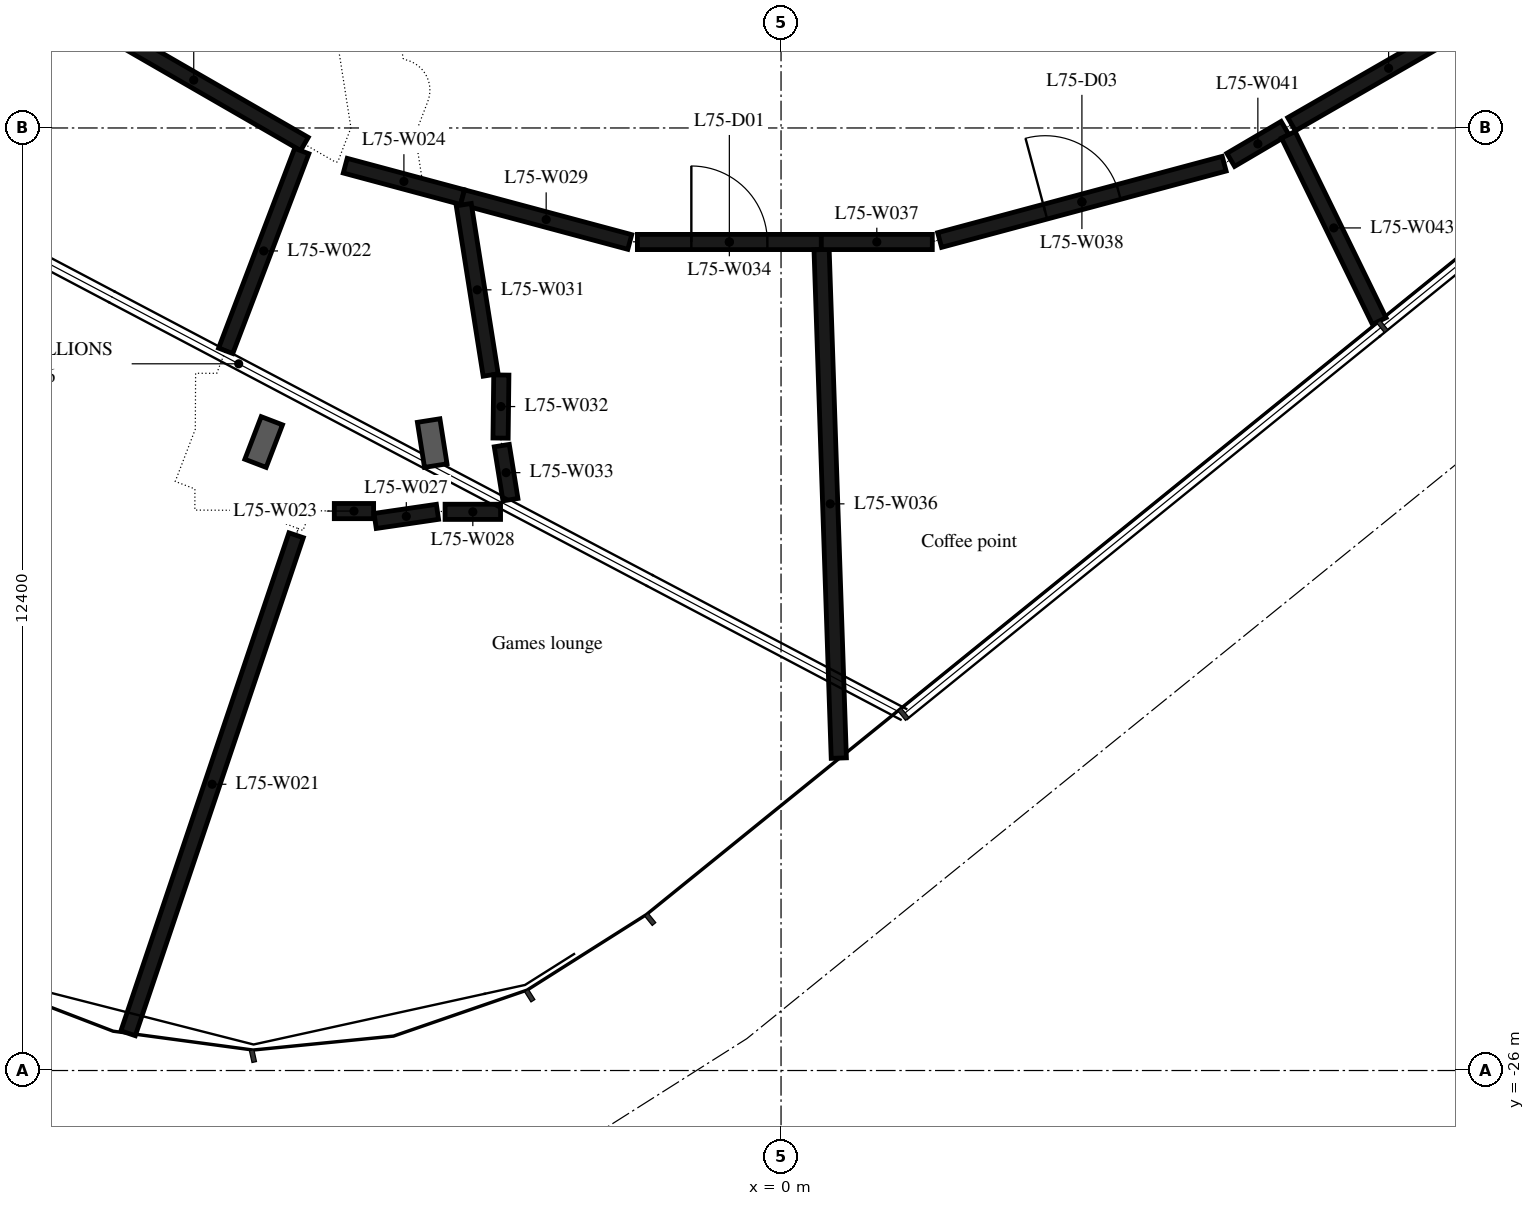
"""IFC4 building model, lengths in metres.
Left out: names, types, materials, properties, quantities, classifications, styles, units other than length and angle.
Written with IfcOpenShell. Run it as: python <this file> out.ifc"""

import sys

from ifc_helpers import new_model, si_unit, direction, frame, frame_2d, origin, place, context, subcontext, project, spatial, rectangle, extrude, element, fill, save


model = new_model("IFC4")
c1 = context("Model", 3, precision=1e-05, world=origin(), true_north=direction((0.0, 1.0)))
c2 = subcontext(c1, "Body", "Model", "MODEL_VIEW")
j1 = project(units=[si_unit("LENGTHUNIT", "METRE"), si_unit("PLANEANGLEUNIT", "RADIAN")], contexts=[c1])
p1 = place(None, origin())
s1 = spatial("IfcSite", under=j1, at=p1, CompositionType="ELEMENT")
p2 = place(p1, origin())
s2 = spatial("IfcBuilding", under=s1, at=p2, CompositionType="ELEMENT")
p3 = place(p2, frame((0.0, 0.0, 291.4)))
s3 = spatial("IfcBuildingStorey", under=s2, at=p3, CompositionType="ELEMENT", Elevation=291.4)
p4 = place(p3, frame((-9.183, -12.13, 0.0), z_axis=(0.0, 0.0, 1.0), x_axis=(0.866261714877, -0.499590473626, 0.0)))
e1 = element("IfcWall", 1, at=p4, inside=s3, PredefinedType="PARTITIONING", context=c2, shape_type="SweptSolid", body=[
    extrude(rectangle(XDim=3.363, YDim=0.2, at=frame_2d((1.682, 0.0))), origin(), (0.0, 0.0, 1.0), 6.35),
])
p5 = place(p3, frame((-6.38, -18.958, 0.0), z_axis=(0.0, 0.0, 1.0), x_axis=(-0.319668100728, -0.947529580212, 0.0)))
e2 = element("IfcWall", 2, at=p5, inside=s3, PredefinedType="PARTITIONING", context=c2, shape_type="SweptSolid", body=[
    extrude(rectangle(XDim=6.915, YDim=0.2, at=frame_2d((3.458, 0.0))), origin(), (0.0, 0.0, 1.0), 6.35),
])
p6 = place(p3, frame((-6.306, -13.904, 0.0), z_axis=(0.0, 0.0, 1.0), x_axis=(-0.355847310917, -0.934544108811, 0.0)))
e3 = element("IfcWall", 3, at=p6, inside=s3, PredefinedType="PARTITIONING", context=c2, shape_type="SweptSolid", body=[
    extrude(rectangle(XDim=2.812, YDim=0.2, at=frame_2d((1.406, 0.0))), origin(), (0.0, 0.0, 1.0), 6.35),
])
p7 = place(p3, frame((-5.877, -18.64, 0.0), z_axis=(0.0, 0.0, 1.0), x_axis=(1.0, 0.0, 0.0)))
e4 = element("IfcWall", 4, at=p7, inside=s3, PredefinedType="PARTITIONING", context=c2, shape_type="SweptSolid", body=[
    extrude(rectangle(XDim=0.517, YDim=0.2, at=frame_2d((0.259, 0.0))), origin(), (0.0, 0.0, 1.0), 6.35),
])
p8 = place(p3, frame((-5.733, -14.096, 0.0), z_axis=(0.0, 0.0, 1.0), x_axis=(0.965848432571, -0.259107709845, 0.0)))
e5 = element("IfcWall", 5, at=p8, inside=s3, PredefinedType="PARTITIONING", context=c2, shape_type="SweptSolid", body=[
    extrude(rectangle(XDim=1.598, YDim=0.2, at=frame_2d((0.799, 0.0))), origin(), (0.0, 0.0, 1.0), 6.35),
])
p9 = place(p3, frame((-5.34, -18.77, 0.0), z_axis=(0.0, 0.0, 1.0), x_axis=(0.9894425278, 0.144925788532, 0.0)))
e6 = element("IfcWall", 6, at=p9, inside=s3, PredefinedType="PARTITIONING", context=c2, shape_type="SweptSolid", body=[
    extrude(rectangle(XDim=0.829, YDim=0.2, at=frame_2d((0.415, 0.0))), origin(), (0.0, 0.0, 1.0), 6.35),
])
p10 = place(p3, frame((-4.42, -18.65, 0.0), z_axis=(0.0, 0.0, 1.0), x_axis=(1.0, 0.0, 0.0)))
e7 = element("IfcWall", 7, at=p10, inside=s3, PredefinedType="PARTITIONING", context=c2, shape_type="SweptSolid", body=[
    extrude(rectangle(XDim=0.73, YDim=0.2, at=frame_2d((0.365, 0.0))), origin(), (0.0, 0.0, 1.0), 6.35),
])
p11 = place(p3, frame((-4.19, -14.51, 0.0), z_axis=(0.0, 0.0, 1.0), x_axis=(0.965858538716, -0.259070035299, 0.0)))
e8 = element("IfcWall", 8, at=p11, inside=s3, PredefinedType="PARTITIONING", context=c2, shape_type="SweptSolid", body=[
    extrude(rectangle(XDim=2.278, YDim=0.2, at=frame_2d((1.139, 0.0))), origin(), (0.0, 0.0, 1.0), 6.35),
])
p12 = place(p3, frame((-3.82, -16.85, 0.0), z_axis=(0.0, 0.0, 1.0), x_axis=(-0.156122803255, 0.98773765257, 0.0)))
e9 = element("IfcWall", 9, at=p12, inside=s3, PredefinedType="PARTITIONING", context=c2, shape_type="SweptSolid", body=[
    extrude(rectangle(XDim=2.269, YDim=0.2, at=frame_2d((1.135, 0.0))), origin(), (0.0, 0.0, 1.0), 6.35),
])
p13 = place(p3, frame((-3.69, -17.68, 0.0), z_axis=(0.0, 0.0, 1.0), x_axis=(0.012061493839, 0.999927257537, 0.0)))
e10 = element("IfcWall", 10, at=p13, inside=s3, PredefinedType="PARTITIONING", context=c2, shape_type="SweptSolid", body=[
    extrude(rectangle(XDim=0.83, YDim=0.2, at=frame_2d((0.415, 0.0))), origin(), (0.0, 0.0, 1.0), 6.35),
])
p14 = place(p3, frame((-3.56, -18.49, 0.0), z_axis=(0.0, 0.0, 1.0), x_axis=(-0.158294553347, 0.987391935546, 0.0)))
e11 = element("IfcWall", 11, at=p14, inside=s3, PredefinedType="PARTITIONING", context=c2, shape_type="SweptSolid", body=[
    extrude(rectangle(XDim=0.72, YDim=0.2, at=frame_2d((0.36, 0.0))), origin(), (0.0, 0.0, 1.0), 6.35),
])
p15 = place(p3, frame((-1.89, -15.1, 0.0), z_axis=(0.0, 0.0, 1.0), x_axis=(1.0, 0.0, 0.0)))
e12 = element("IfcWall", 12, at=p15, inside=s3, PredefinedType="PARTITIONING", context=c2, shape_type="SweptSolid", body=[
    extrude(rectangle(XDim=2.42, YDim=0.2, at=frame_2d((1.21, 0.0))), origin(), (0.0, 0.0, 1.0), 6.35),
])
p16 = place(p15, frame((0.71, 0.0, 0.0)))
e13 = element("IfcOpeningElement", 13, at=p16, cuts=e12, PredefinedType="OPENING", context=c2, shape_type="SweptSolid", body=[
    extrude(rectangle(XDim=1.0, YDim=2.1, at=frame_2d((0.5, 1.05))), frame((0.0, 0.11, 0.0), z_axis=(0.0, -1.0, 0.0), x_axis=(1.0, 0.0, 0.0)), (0.0, 0.0, 1.0), 0.22),
])
p17 = place(p3, frame((0.533, -15.2, 0.0), z_axis=(0.0, 0.0, 1.0), x_axis=(0.033846737046, -0.999427035051, 0.0)))
e14 = element("IfcWall", 14, at=p17, inside=s3, PredefinedType="PARTITIONING", context=c2, shape_type="SweptSolid", body=[
    extrude(rectangle(XDim=6.694, YDim=0.2, at=frame_2d((3.347, 0.0))), origin(), (0.0, 0.0, 1.0), 6.35),
])
p18 = place(p3, frame((0.53, -15.1, 0.0), z_axis=(0.0, 0.0, 1.0), x_axis=(1.0, 0.0, 0.0)))
e15 = element("IfcWall", 15, at=p18, inside=s3, PredefinedType="PARTITIONING", context=c2, shape_type="SweptSolid", body=[
    extrude(rectangle(XDim=1.46, YDim=0.2, at=frame_2d((0.73, 0.0))), origin(), (0.0, 0.0, 1.0), 6.35),
])
p19 = place(p3, frame((2.087, -15.074, 0.0), z_axis=(0.0, 0.0, 1.0), x_axis=(0.965870133458, 0.259026804199, 0.0)))
e16 = element("IfcWall", 16, at=p19, inside=s3, PredefinedType="PARTITIONING", context=c2, shape_type="SweptSolid", body=[
    extrude(rectangle(XDim=3.876, YDim=0.2, at=frame_2d((1.938, 0.0))), origin(), (0.0, 0.0, 1.0), 6.35),
])
p20 = place(p19, frame((1.438, 0.0, 0.0)))
e17 = element("IfcOpeningElement", 17, at=p20, cuts=e16, PredefinedType="OPENING", context=c2, shape_type="SweptSolid", body=[
    extrude(rectangle(XDim=1.0, YDim=2.1, at=frame_2d((0.5, 1.05))), frame((0.0, 0.11, 0.0), z_axis=(0.0, -1.0, 0.0), x_axis=(1.0, 0.0, 0.0)), (0.0, 0.0, 1.0), 0.22),
])
p21 = place(p3, frame((5.916, -14.019, 0.0), z_axis=(0.0, 0.0, 1.0), x_axis=(0.862244964115, 0.506491482513, 0.0)))
e18 = element("IfcWall", 18, at=p21, inside=s3, PredefinedType="PARTITIONING", context=c2, shape_type="SweptSolid", body=[
    extrude(rectangle(XDim=0.828, YDim=0.2, at=frame_2d((0.414, 0.0))), origin(), (0.0, 0.0, 1.0), 6.35),
])
p22 = place(p3, frame((6.674, -13.69, 0.0), z_axis=(0.0, 0.0, 1.0), x_axis=(0.438776447323, -0.898596254875, 0.0)))
e19 = element("IfcWall", 19, at=p22, inside=s3, PredefinedType="PARTITIONING", context=c2, shape_type="SweptSolid", body=[
    extrude(rectangle(XDim=2.726, YDim=0.2, at=frame_2d((1.363, 0.0))), origin(), (0.0, 0.0, 1.0), 6.35),
])
p23 = place(p3, frame((6.717, -13.55, 0.0), z_axis=(0.0, 0.0, 1.0), x_axis=(0.86665285702, 0.498911640894, 0.0)))
e20 = element("IfcWall", 20, at=p23, inside=s3, PredefinedType="PARTITIONING", context=c2, shape_type="SweptSolid", body=[
    extrude(rectangle(XDim=2.946, YDim=0.2, at=frame_2d((1.473, 0.0))), origin(), (0.0, 0.0, 1.0), 6.35),
])
p24 = place(p16, origin())
e21 = element("IfcDoor", 21, at=p24, inside=s3, OperationType="SINGLE_SWING_LEFT", PredefinedType="DOOR", context=c2, shape_type="SweptSolid", body=[
    extrude(rectangle(XDim=1.0, YDim=2.1, at=frame_2d((0.5, 1.05))), frame((0.0, 0.025, 0.0), z_axis=(0.0, -1.0, 0.0), x_axis=(1.0, 0.0, 0.0)), (0.0, 0.0, 1.0), 0.05),
])
fill(e13, e21)
p25 = place(p20, origin())
e22 = element("IfcDoor", 22, at=p25, inside=s3, OperationType="SINGLE_SWING_LEFT", PredefinedType="DOOR", context=c2, shape_type="SweptSolid", body=[
    extrude(rectangle(XDim=1.0, YDim=2.1, at=frame_2d((0.5, 1.05))), frame((0.0, 0.025, 0.0), z_axis=(0.0, -1.0, 0.0), x_axis=(1.0, 0.0, 0.0)), (0.0, 0.0, 1.0), 0.05),
])
fill(e17, e22)
save(model, sys.argv[1])
